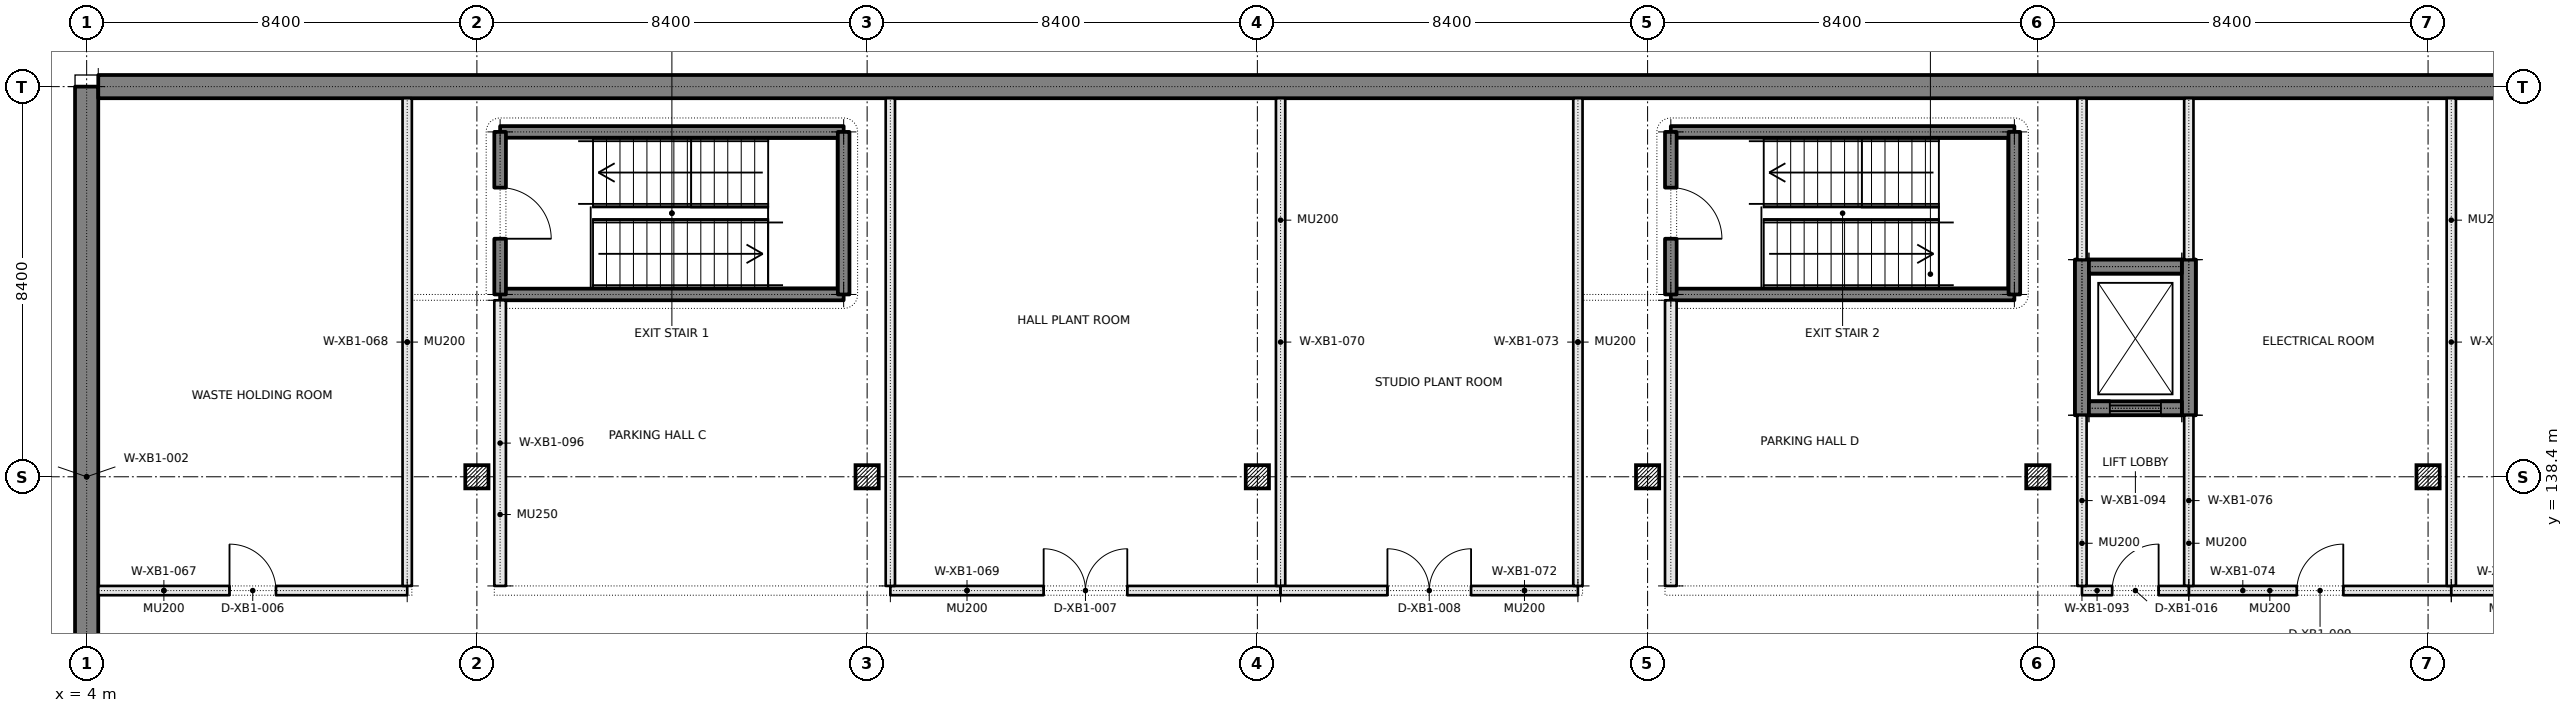
"""IFC4 building model, lengths in metres.
Left out: names, types, materials, properties, quantities, classifications, styles, units other than length and angle.
Written with IfcOpenShell. Run it as: python <this file> out.ifc"""

import sys

from ifc_helpers import new_model, si_unit, direction, frame, frame_2d, origin, origin_2d, place, context, subcontext, project, spatial, rectangle, extrude, element, fill, save


model = new_model("IFC4")
c1 = context("Model", 3, precision=1e-05, world=origin(), true_north=direction((0.0, 1.0)))
c2 = subcontext(c1, "Body", "Model", "MODEL_VIEW")
j1 = project(units=[si_unit("LENGTHUNIT", "METRE"), si_unit("PLANEANGLEUNIT", "RADIAN")], contexts=[c1])
p1 = place(None, origin())
s1 = spatial("IfcSite", under=j1, at=p1, CompositionType="ELEMENT")
p2 = place(p1, origin())
s2 = spatial("IfcBuilding", under=s1, at=p2, CompositionType="ELEMENT")
p3 = place(p2, frame((0.0, 0.0, -4.6)))
s3 = spatial("IfcBuildingStorey", under=s2, at=p3, CompositionType="ELEMENT", Elevation=-4.6)
p4 = place(p3, frame((4.0, 130.0, 0.0), z_axis=(0.0, 0.0, 1.0), x_axis=(0.0, 1.0, 0.0)))
e1 = element("IfcWall", 1, at=p4, inside=s3, PredefinedType="SOLIDWALL", context=c2, shape_type="SweptSolid", body=[
    extrude(rectangle(XDim=16.8, YDim=0.5, at=frame_2d((8.4, 0.0))), origin(), (0.0, 0.0, 1.0), 4.19),
])
p5 = place(p3, frame((4.25, 146.8, 0.0), z_axis=(0.0, 0.0, 1.0), x_axis=(1.0, 0.0, 0.0)))
e2 = element("IfcWall", 2, at=p5, inside=s3, PredefinedType="SOLIDWALL", context=c2, shape_type="SweptSolid", body=[
    extrude(rectangle(XDim=110.2, YDim=0.5, at=frame_2d((55.1, 0.0))), origin(), (0.0, 0.0, 1.0), 4.19),
])
for number, where, z_axis, x_axis in (
    (3, (12.4, 138.4, 0.0), (0.0, 0.0, 1.0), (1.0, 0.0, 0.0)),
    (4, (20.8, 138.4, 0.0), (0.0, 0.0, 1.0), (1.0, 0.0, 0.0)),
    (5, (29.2, 138.4, 0.0), (0.0, 0.0, 1.0), (1.0, 0.0, 0.0)),
    (6, (37.6, 138.4, 0.0), (0.0, 0.0, 1.0), (1.0, 0.0, 0.0)),
    (7, (46.0, 138.4, 0.0), (0.0, 0.0, 1.0), (1.0, 0.0, 0.0)),
    (8, (54.4, 138.4, 0.0), (0.0, 0.0, 1.0), (1.0, 0.0, 0.0)),
):
    element("IfcColumn", number, at=place(p3, frame(where, z_axis=z_axis, x_axis=x_axis)), inside=s3, PredefinedType="COLUMN", context=c2, shape_type="SweptSolid", body=[
        extrude(rectangle(XDim=0.5, YDim=0.5, at=origin_2d()), origin(), (0.0, 0.0, 1.0), 4.6),
    ])
for number, where, z_axis, x_axis in (
    (9, (12.9, 142.325, 0.0), (0.0, 0.0, 1.0), (1.0, 0.0, 0.0)),
    (10, (12.9, 145.825, 0.0), (0.0, 0.0, 1.0), (1.0, 0.0, 0.0)),
):
    element("IfcWall", number, at=place(p3, frame(where, z_axis=z_axis, x_axis=x_axis)), inside=s3, PredefinedType="SOLIDWALL", context=c2, shape_type="SweptSolid", body=[
        extrude(rectangle(XDim=7.395, YDim=0.25, at=frame_2d((3.698, 0.0))), origin(), (0.0, 0.0, 1.0), 4.19),
    ])
p6 = place(p3, frame((12.9, 142.325, 0.0), z_axis=(0.0, 0.0, 1.0), x_axis=(0.0, 1.0, 0.0)))
e11 = element("IfcWall", 11, at=p6, inside=s3, PredefinedType="SOLIDWALL", context=c2, shape_type="SweptSolid", body=[
    extrude(rectangle(XDim=3.5, YDim=0.25, at=frame_2d((1.75, 0.0))), origin(), (0.0, 0.0, 1.0), 4.19),
])
p7 = place(p6, frame((1.2, 0.0, 0.0)))
e12 = element("IfcOpeningElement", 12, at=p7, cuts=e11, PredefinedType="OPENING", context=c2, shape_type="SweptSolid", body=[
    extrude(rectangle(XDim=1.1, YDim=2.1, at=frame_2d((0.55, 1.05))), frame((0.0, 0.135, 0.0), z_axis=(0.0, -1.0, 0.0), x_axis=(1.0, 0.0, 0.0)), (0.0, 0.0, 1.0), 0.27),
])
p8 = place(p3, frame((20.295, 142.325, 0.0), z_axis=(0.0, 0.0, 1.0), x_axis=(0.0, 1.0, 0.0)))
e13 = element("IfcWall", 13, at=p8, inside=s3, PredefinedType="SOLIDWALL", context=c2, shape_type="SweptSolid", body=[
    extrude(rectangle(XDim=3.5, YDim=0.25, at=frame_2d((1.75, 0.0))), origin(), (0.0, 0.0, 1.0), 4.19),
])
for number, where, z_axis, x_axis in (
    (14, (38.1, 142.325, 0.0), (0.0, 0.0, 1.0), (1.0, 0.0, 0.0)),
    (15, (38.1, 145.825, 0.0), (0.0, 0.0, 1.0), (1.0, 0.0, 0.0)),
):
    element("IfcWall", number, at=place(p3, frame(where, z_axis=z_axis, x_axis=x_axis)), inside=s3, PredefinedType="SOLIDWALL", context=c2, shape_type="SweptSolid", body=[
        extrude(rectangle(XDim=7.395, YDim=0.25, at=frame_2d((3.698, 0.0))), origin(), (0.0, 0.0, 1.0), 4.19),
    ])
p9 = place(p3, frame((38.1, 142.325, 0.0), z_axis=(0.0, 0.0, 1.0), x_axis=(0.0, 1.0, 0.0)))
e16 = element("IfcWall", 16, at=p9, inside=s3, PredefinedType="SOLIDWALL", context=c2, shape_type="SweptSolid", body=[
    extrude(rectangle(XDim=3.5, YDim=0.25, at=frame_2d((1.75, 0.0))), origin(), (0.0, 0.0, 1.0), 4.19),
])
p10 = place(p9, frame((1.2, 0.0, 0.0)))
e17 = element("IfcOpeningElement", 17, at=p10, cuts=e16, PredefinedType="OPENING", context=c2, shape_type="SweptSolid", body=[
    extrude(rectangle(XDim=1.1, YDim=2.1, at=frame_2d((0.55, 1.05))), frame((0.0, 0.135, 0.0), z_axis=(0.0, -1.0, 0.0), x_axis=(1.0, 0.0, 0.0)), (0.0, 0.0, 1.0), 0.27),
])
p11 = place(p3, frame((45.495, 142.325, 0.0), z_axis=(0.0, 0.0, 1.0), x_axis=(0.0, 1.0, 0.0)))
e18 = element("IfcWall", 18, at=p11, inside=s3, PredefinedType="SOLIDWALL", context=c2, shape_type="SweptSolid", body=[
    extrude(rectangle(XDim=3.5, YDim=0.25, at=frame_2d((1.75, 0.0))), origin(), (0.0, 0.0, 1.0), 4.19),
])
for number, where, z_axis, x_axis in (
    (19, (46.95, 139.725, 0.0), (0.0, 0.0, 1.0), (0.0, 1.0, 0.0)),
    (20, (49.25, 139.725, 0.0), (0.0, 0.0, 1.0), (0.0, 1.0, 0.0)),
):
    element("IfcWall", number, at=place(p3, frame(where, z_axis=z_axis, x_axis=x_axis)), inside=s3, PredefinedType="SOLIDWALL", context=c2, shape_type="SweptSolid", body=[
        extrude(rectangle(XDim=3.35, YDim=0.3, at=frame_2d((1.675, 0.0))), origin(), (0.0, 0.0, 1.0), 4.6),
    ])
p12 = place(p3, frame((47.1, 139.875, 0.0), z_axis=(0.0, 0.0, 1.0), x_axis=(1.0, 0.0, 0.0)))
e21 = element("IfcWall", 21, at=p12, inside=s3, PredefinedType="SOLIDWALL", context=c2, shape_type="SweptSolid", body=[
    extrude(rectangle(XDim=2.0, YDim=0.3, at=frame_2d((1.0, 0.0))), origin(), (0.0, 0.0, 1.0), 4.6),
])
p13 = place(p12, frame((0.45, 0.0, 0.0)))
e22 = element("IfcOpeningElement", 22, at=p13, cuts=e21, PredefinedType="OPENING", context=c2, shape_type="SweptSolid", body=[
    extrude(rectangle(XDim=1.1, YDim=2.1, at=frame_2d((0.55, 1.05))), frame((0.0, 0.16, 0.0), z_axis=(0.0, -1.0, 0.0), x_axis=(1.0, 0.0, 0.0)), (0.0, 0.0, 1.0), 0.32),
])
p14 = place(p3, frame((47.1, 142.925, 0.0), z_axis=(0.0, 0.0, 1.0), x_axis=(1.0, 0.0, 0.0)))
e23 = element("IfcWall", 23, at=p14, inside=s3, PredefinedType="SOLIDWALL", context=c2, shape_type="SweptSolid", body=[
    extrude(rectangle(XDim=2.0, YDim=0.3, at=frame_2d((1.0, 0.0))), origin(), (0.0, 0.0, 1.0), 4.6),
])
for number, where, z_axis, x_axis in (
    (24, (46.95, 139.725, -1.6), (0.0, 0.0, 1.0), (0.0, 1.0, 0.0)),
    (25, (49.25, 139.725, -1.6), (0.0, 0.0, 1.0), (0.0, 1.0, 0.0)),
):
    element("IfcWall", number, at=place(p3, frame(where, z_axis=z_axis, x_axis=x_axis)), inside=s3, PredefinedType="SOLIDWALL", context=c2, shape_type="SweptSolid", body=[
        extrude(rectangle(XDim=3.35, YDim=0.3, at=frame_2d((1.675, 0.0))), origin(), (0.0, 0.0, 1.0), 1.6),
    ])
for number, where, z_axis, x_axis in (
    (26, (47.1, 139.875, -1.6), (0.0, 0.0, 1.0), (1.0, 0.0, 0.0)),
    (27, (47.1, 142.925, -1.6), (0.0, 0.0, 1.0), (1.0, 0.0, 0.0)),
):
    element("IfcWall", number, at=place(p3, frame(where, z_axis=z_axis, x_axis=x_axis)), inside=s3, PredefinedType="SOLIDWALL", context=c2, shape_type="SweptSolid", body=[
        extrude(rectangle(XDim=2.0, YDim=0.3, at=frame_2d((1.0, 0.0))), origin(), (0.0, 0.0, 1.0), 1.6),
    ])
p15 = place(p3, frame((4.25, 135.95, 0.0), z_axis=(0.0, 0.0, 1.0), x_axis=(1.0, 0.0, 0.0)))
e28 = element("IfcWall", 28, at=p15, inside=s3, PredefinedType="SOLIDWALL", context=c2, shape_type="SweptSolid", body=[
    extrude(rectangle(XDim=6.65, YDim=0.2, at=frame_2d((3.325, 0.0))), origin(), (0.0, 0.0, 1.0), 4.19),
])
p16 = place(p15, frame((2.825, 0.0, 0.0)))
e29 = element("IfcOpeningElement", 29, at=p16, cuts=e28, PredefinedType="OPENING", context=c2, shape_type="SweptSolid", body=[
    extrude(rectangle(XDim=1.0, YDim=2.1, at=frame_2d((0.5, 1.05))), frame((0.0, 0.11, 0.0), z_axis=(0.0, -1.0, 0.0), x_axis=(1.0, 0.0, 0.0)), (0.0, 0.0, 1.0), 0.22),
])
p17 = place(p3, frame((10.9, 136.05, 0.0), z_axis=(0.0, 0.0, 1.0), x_axis=(0.0, 1.0, 0.0)))
e30 = element("IfcWall", 30, at=p17, inside=s3, PredefinedType="SOLIDWALL", context=c2, shape_type="SweptSolid", body=[
    extrude(rectangle(XDim=10.5, YDim=0.2, at=frame_2d((5.25, 0.0))), origin(), (0.0, 0.0, 1.0), 4.19),
])
p18 = place(p3, frame((21.3, 135.95, 0.0), z_axis=(0.0, 0.0, 1.0), x_axis=(1.0, 0.0, 0.0)))
e31 = element("IfcWall", 31, at=p18, inside=s3, PredefinedType="SOLIDWALL", context=c2, shape_type="SweptSolid", body=[
    extrude(rectangle(XDim=8.4, YDim=0.2, at=frame_2d((4.2, 0.0))), origin(), (0.0, 0.0, 1.0), 4.19),
])
p19 = place(p18, frame((3.3, 0.0, 0.0)))
e32 = element("IfcOpeningElement", 32, at=p19, cuts=e31, PredefinedType="OPENING", context=c2, shape_type="SweptSolid", body=[
    extrude(rectangle(XDim=1.8, YDim=2.1, at=frame_2d((0.9, 1.05))), frame((0.0, 0.11, 0.0), z_axis=(0.0, -1.0, 0.0), x_axis=(1.0, 0.0, 0.0)), (0.0, 0.0, 1.0), 0.22),
])
for number, where, z_axis, x_axis in (
    (33, (29.7, 136.05, 0.0), (0.0, 0.0, 1.0), (0.0, 1.0, 0.0)),
    (34, (21.3, 136.05, 0.0), (0.0, 0.0, 1.0), (0.0, 1.0, 0.0)),
):
    element("IfcWall", number, at=place(p3, frame(where, z_axis=z_axis, x_axis=x_axis)), inside=s3, PredefinedType="SOLIDWALL", context=c2, shape_type="SweptSolid", body=[
        extrude(rectangle(XDim=10.5, YDim=0.2, at=frame_2d((5.25, 0.0))), origin(), (0.0, 0.0, 1.0), 4.19),
    ])
p20 = place(p3, frame((29.7, 135.95, 0.0), z_axis=(0.0, 0.0, 1.0), x_axis=(1.0, 0.0, 0.0)))
e35 = element("IfcWall", 35, at=p20, inside=s3, PredefinedType="SOLIDWALL", context=c2, shape_type="SweptSolid", body=[
    extrude(rectangle(XDim=6.4, YDim=0.2, at=frame_2d((3.2, 0.0))), origin(), (0.0, 0.0, 1.0), 4.19),
])
p21 = place(p20, frame((2.3, 0.0, 0.0)))
e36 = element("IfcOpeningElement", 36, at=p21, cuts=e35, PredefinedType="OPENING", context=c2, shape_type="SweptSolid", body=[
    extrude(rectangle(XDim=1.8, YDim=2.1, at=frame_2d((0.9, 1.05))), frame((0.0, 0.11, 0.0), z_axis=(0.0, -1.0, 0.0), x_axis=(1.0, 0.0, 0.0)), (0.0, 0.0, 1.0), 0.22),
])
p22 = place(p3, frame((36.1, 136.05, 0.0), z_axis=(0.0, 0.0, 1.0), x_axis=(0.0, 1.0, 0.0)))
e37 = element("IfcWall", 37, at=p22, inside=s3, PredefinedType="SOLIDWALL", context=c2, shape_type="SweptSolid", body=[
    extrude(rectangle(XDim=10.5, YDim=0.2, at=frame_2d((5.25, 0.0))), origin(), (0.0, 0.0, 1.0), 4.19),
])
p23 = place(p3, frame((49.25, 135.95, 0.0), z_axis=(0.0, 0.0, 1.0), x_axis=(1.0, 0.0, 0.0)))
e38 = element("IfcWall", 38, at=p23, inside=s3, PredefinedType="SOLIDWALL", context=c2, shape_type="SweptSolid", body=[
    extrude(rectangle(XDim=5.65, YDim=0.2, at=frame_2d((2.825, 0.0))), origin(), (0.0, 0.0, 1.0), 4.19),
])
p24 = place(p23, frame((2.325, 0.0, 0.0)))
e39 = element("IfcOpeningElement", 39, at=p24, cuts=e38, PredefinedType="OPENING", context=c2, shape_type="SweptSolid", body=[
    extrude(rectangle(XDim=1.0, YDim=2.1, at=frame_2d((0.5, 1.05))), frame((0.0, 0.11, 0.0), z_axis=(0.0, -1.0, 0.0), x_axis=(1.0, 0.0, 0.0)), (0.0, 0.0, 1.0), 0.22),
])
p25 = place(p3, frame((54.9, 136.05, 0.0), z_axis=(0.0, 0.0, 1.0), x_axis=(0.0, 1.0, 0.0)))
e40 = element("IfcWall", 40, at=p25, inside=s3, PredefinedType="SOLIDWALL", context=c2, shape_type="SweptSolid", body=[
    extrude(rectangle(XDim=10.5, YDim=0.2, at=frame_2d((5.25, 0.0))), origin(), (0.0, 0.0, 1.0), 4.19),
])
p26 = place(p3, frame((49.25, 136.05, 0.0), z_axis=(0.0, 0.0, 1.0), x_axis=(0.0, 1.0, 0.0)))
e41 = element("IfcWall", 41, at=p26, inside=s3, PredefinedType="SOLIDWALL", context=c2, shape_type="SweptSolid", body=[
    extrude(rectangle(XDim=3.675, YDim=0.2, at=frame_2d((1.837, 0.0))), origin(), (0.0, 0.0, 1.0), 4.19),
])
p27 = place(p3, frame((49.25, 143.075, 0.0), z_axis=(0.0, 0.0, 1.0), x_axis=(0.0, 1.0, 0.0)))
e42 = element("IfcWall", 42, at=p27, inside=s3, PredefinedType="SOLIDWALL", context=c2, shape_type="SweptSolid", body=[
    extrude(rectangle(XDim=3.475, YDim=0.2, at=frame_2d((1.738, 0.0))), origin(), (0.0, 0.0, 1.0), 4.19),
])
p28 = place(p3, frame((54.9, 135.95, 0.0), z_axis=(0.0, 0.0, 1.0), x_axis=(1.0, 0.0, 0.0)))
e43 = element("IfcWall", 43, at=p28, inside=s3, PredefinedType="SOLIDWALL", context=c2, shape_type="SweptSolid", body=[
    extrude(rectangle(XDim=6.0, YDim=0.2, at=frame_2d((3.0, 0.0))), origin(), (0.0, 0.0, 1.0), 4.19),
])
p29 = place(p28, frame((2.5, 0.0, 0.0)))
e44 = element("IfcOpeningElement", 44, at=p29, cuts=e43, PredefinedType="OPENING", context=c2, shape_type="SweptSolid", body=[
    extrude(rectangle(XDim=1.0, YDim=2.1, at=frame_2d((0.5, 1.05))), frame((0.0, 0.11, 0.0), z_axis=(0.0, -1.0, 0.0), x_axis=(1.0, 0.0, 0.0)), (0.0, 0.0, 1.0), 0.22),
])
p30 = place(p3, frame((46.95, 135.95, 0.0), z_axis=(0.0, 0.0, 1.0), x_axis=(1.0, 0.0, 0.0)))
e45 = element("IfcWall", 45, at=p30, inside=s3, PredefinedType="SOLIDWALL", context=c2, shape_type="SweptSolid", body=[
    extrude(rectangle(XDim=2.3, YDim=0.2, at=frame_2d((1.15, 0.0))), origin(), (0.0, 0.0, 1.0), 4.19),
])
p31 = place(p30, frame((0.65, 0.0, 0.0)))
e46 = element("IfcOpeningElement", 46, at=p31, cuts=e45, PredefinedType="OPENING", context=c2, shape_type="SweptSolid", body=[
    extrude(rectangle(XDim=1.0, YDim=2.1, at=frame_2d((0.5, 1.05))), frame((0.0, 0.11, 0.0), z_axis=(0.0, -1.0, 0.0), x_axis=(1.0, 0.0, 0.0)), (0.0, 0.0, 1.0), 0.22),
])
p32 = place(p3, frame((46.95, 136.05, 0.0), z_axis=(0.0, 0.0, 1.0), x_axis=(0.0, 1.0, 0.0)))
e47 = element("IfcWall", 47, at=p32, inside=s3, PredefinedType="SOLIDWALL", context=c2, shape_type="SweptSolid", body=[
    extrude(rectangle(XDim=3.675, YDim=0.2, at=frame_2d((1.837, 0.0))), origin(), (0.0, 0.0, 1.0), 4.19),
])
for number, where, z_axis, x_axis in (
    (48, (12.9, 136.05, 0.0), (0.0, 0.0, 1.0), (0.0, 1.0, 0.0)),
    (49, (38.1, 136.05, 0.0), (0.0, 0.0, 1.0), (0.0, 1.0, 0.0)),
):
    element("IfcWall", number, at=place(p3, frame(where, z_axis=z_axis, x_axis=x_axis)), inside=s3, PredefinedType="SOLIDWALL", context=c2, shape_type="SweptSolid", body=[
        extrude(rectangle(XDim=6.15, YDim=0.25, at=frame_2d((3.075, 0.0))), origin(), (0.0, 0.0, 1.0), 4.19),
    ])
p33 = place(p3, frame((46.95, 143.075, 0.0), z_axis=(0.0, 0.0, 1.0), x_axis=(0.0, 1.0, 0.0)))
e50 = element("IfcWall", 50, at=p33, inside=s3, PredefinedType="SOLIDWALL", context=c2, shape_type="SweptSolid", body=[
    extrude(rectangle(XDim=3.475, YDim=0.2, at=frame_2d((1.738, 0.0))), origin(), (0.0, 0.0, 1.0), 4.19),
])
p34 = place(p7, frame((1.1, 0.0, 0.0), z_axis=(0.0, 0.0, 1.0), x_axis=(-1.0, 0.0, 0.0)))
e51 = element("IfcDoor", 51, at=p34, inside=s3, OperationType="SINGLE_SWING_RIGHT", PredefinedType="DOOR", context=c2, shape_type="SweptSolid", body=[
    extrude(rectangle(XDim=1.1, YDim=2.1, at=frame_2d((0.55, 1.05))), frame((0.0, 0.025, 0.0), z_axis=(0.0, -1.0, 0.0), x_axis=(1.0, 0.0, 0.0)), (0.0, 0.0, 1.0), 0.05),
])
fill(e12, e51)
p35 = place(p10, frame((1.1, 0.0, 0.0), z_axis=(0.0, 0.0, 1.0), x_axis=(-1.0, 0.0, 0.0)))
e52 = element("IfcDoor", 52, at=p35, inside=s3, OperationType="SINGLE_SWING_RIGHT", PredefinedType="DOOR", context=c2, shape_type="SweptSolid", body=[
    extrude(rectangle(XDim=1.1, YDim=2.1, at=frame_2d((0.55, 1.05))), frame((0.0, 0.025, 0.0), z_axis=(0.0, -1.0, 0.0), x_axis=(1.0, 0.0, 0.0)), (0.0, 0.0, 1.0), 0.05),
])
fill(e17, e52)
p36 = place(p13, origin())
e53 = element("IfcDoor", 53, at=p36, inside=s3, OperationType="SLIDING_TO_LEFT", PredefinedType="DOOR", context=c2, shape_type="SweptSolid", body=[
    extrude(rectangle(XDim=1.1, YDim=2.1, at=frame_2d((0.55, 1.05))), frame((0.0, 0.025, 0.0), z_axis=(0.0, -1.0, 0.0), x_axis=(1.0, 0.0, 0.0)), (0.0, 0.0, 1.0), 0.05),
])
fill(e22, e53)
p37 = place(p16, origin())
e54 = element("IfcDoor", 54, at=p37, inside=s3, OperationType="SINGLE_SWING_LEFT", PredefinedType="DOOR", context=c2, shape_type="SweptSolid", body=[
    extrude(rectangle(XDim=1.0, YDim=2.1, at=frame_2d((0.5, 1.05))), frame((0.0, 0.025, 0.0), z_axis=(0.0, -1.0, 0.0), x_axis=(1.0, 0.0, 0.0)), (0.0, 0.0, 1.0), 0.05),
])
fill(e29, e54)
p38 = place(p19, origin())
e55 = element("IfcDoor", 55, at=p38, inside=s3, OperationType="DOUBLE_DOOR_SINGLE_SWING", PredefinedType="DOOR", context=c2, shape_type="SweptSolid", body=[
    extrude(rectangle(XDim=1.8, YDim=2.1, at=frame_2d((0.9, 1.05))), frame((0.0, 0.025, 0.0), z_axis=(0.0, -1.0, 0.0), x_axis=(1.0, 0.0, 0.0)), (0.0, 0.0, 1.0), 0.05),
])
fill(e32, e55)
p39 = place(p21, origin())
e56 = element("IfcDoor", 56, at=p39, inside=s3, OperationType="DOUBLE_DOOR_SINGLE_SWING", PredefinedType="DOOR", context=c2, shape_type="SweptSolid", body=[
    extrude(rectangle(XDim=1.8, YDim=2.1, at=frame_2d((0.9, 1.05))), frame((0.0, 0.025, 0.0), z_axis=(0.0, -1.0, 0.0), x_axis=(1.0, 0.0, 0.0)), (0.0, 0.0, 1.0), 0.05),
])
fill(e36, e56)
p40 = place(p24, origin())
e57 = element("IfcDoor", 57, at=p40, inside=s3, OperationType="SINGLE_SWING_RIGHT", PredefinedType="DOOR", context=c2, shape_type="SweptSolid", body=[
    extrude(rectangle(XDim=1.0, YDim=2.1, at=frame_2d((0.5, 1.05))), frame((0.0, 0.025, 0.0), z_axis=(0.0, -1.0, 0.0), x_axis=(1.0, 0.0, 0.0)), (0.0, 0.0, 1.0), 0.05),
])
fill(e39, e57)
p41 = place(p31, origin())
e58 = element("IfcDoor", 58, at=p41, inside=s3, OperationType="SINGLE_SWING_RIGHT", PredefinedType="DOOR", context=c2, shape_type="SweptSolid", body=[
    extrude(rectangle(XDim=1.0, YDim=2.1, at=frame_2d((0.5, 1.05))), frame((0.0, 0.025, 0.0), z_axis=(0.0, -1.0, 0.0), x_axis=(1.0, 0.0, 0.0)), (0.0, 0.0, 1.0), 0.05),
])
fill(e46, e58)
save(model, sys.argv[1])
